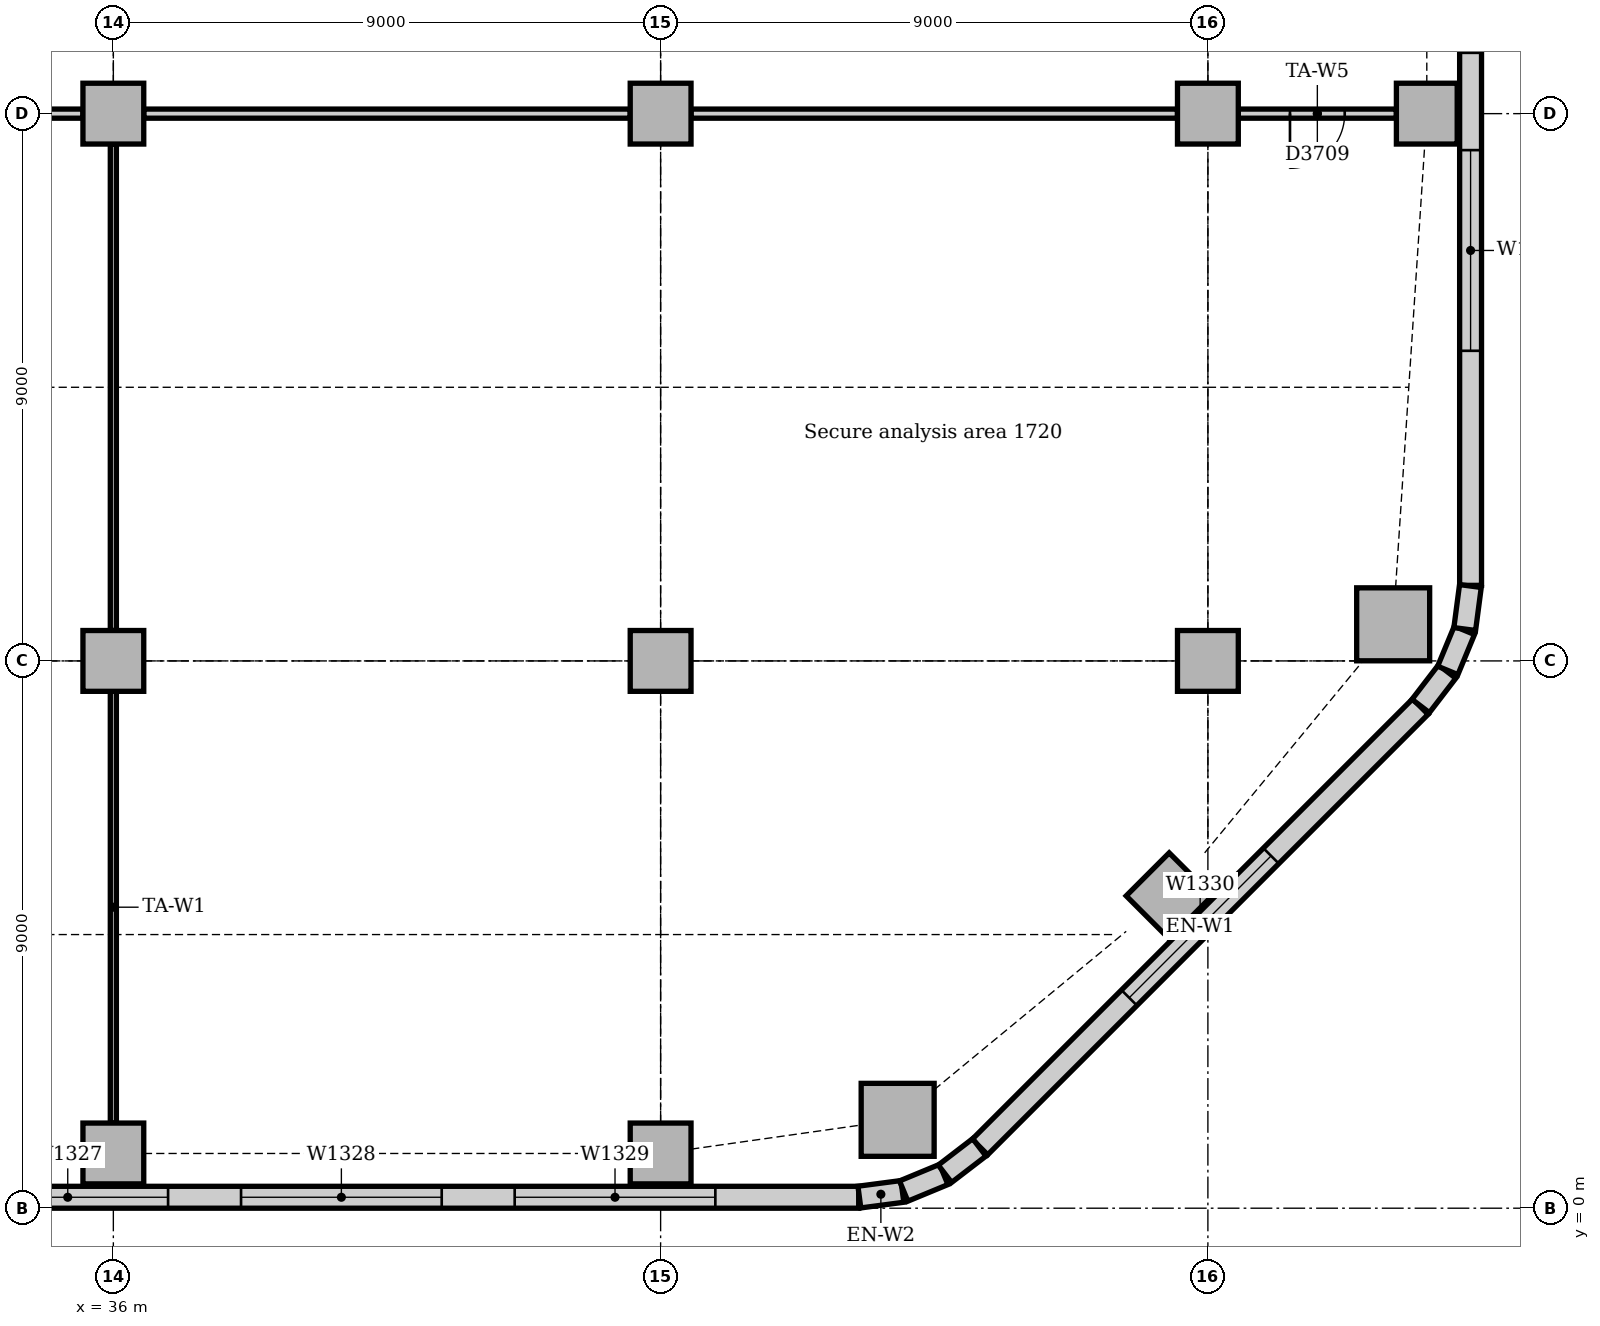
"""IFC4 building model, lengths in metres.
Left out: names, types, materials, properties, quantities, classifications, styles, units other than length and angle.
Written with IfcOpenShell. Run it as: python <this file> out.ifc"""

import sys

from ifc_helpers import new_model, si_unit, direction, frame, frame_2d, origin, origin_2d, place, context, subcontext, project, spatial, rectangle, extrude, element, fill, save


model = new_model("IFC4")
c1 = context("Model", 3, precision=1e-05, world=origin(), true_north=direction((0.0, 1.0)))
c2 = subcontext(c1, "Body", "Model", "MODEL_VIEW")
j1 = project(units=[si_unit("LENGTHUNIT", "METRE"), si_unit("PLANEANGLEUNIT", "RADIAN")], contexts=[c1])
p1 = place(None, origin())
s1 = spatial("IfcSite", under=j1, at=p1, CompositionType="ELEMENT")
p2 = place(p1, origin())
s2 = spatial("IfcBuilding", under=s1, at=p2, CompositionType="ELEMENT")
p3 = place(p2, frame((0.0, 0.0, 75.0)))
s3 = spatial("IfcBuildingStorey", under=s2, at=p3, CompositionType="ELEMENT", Elevation=75.0)
for number, where, z_axis, x_axis in (
    (1, (48.898, 1.453, 0.0), (0.0, 0.0, 1.0), (1.0, 0.0, 0.0)),
    (2, (57.047, 9.602, 0.0), (0.0, 0.0, 1.0), (1.0, 0.0, 0.0)),
):
    element("IfcColumn", number, at=place(p3, frame(where, z_axis=z_axis, x_axis=x_axis)), inside=s3, PredefinedType="COLUMN", context=c2, shape_type="SweptSolid", body=[
        extrude(rectangle(XDim=1.2, YDim=1.2, at=origin_2d()), origin(), (0.0, 0.0, 1.0), 3.85),
    ])
for number, where, z_axis, x_axis in (
    (3, (36.0, 0.9, 0.0), (0.0, 0.0, 1.0), (1.0, 0.0, 0.0)),
    (4, (45.0, 0.9, 0.0), (0.0, 0.0, 1.0), (1.0, 0.0, 0.0)),
    (5, (53.364, 5.136, 0.0), (0.0, 0.0, 1.0), (0.707, 0.707, 0.0)),
    (6, (57.6, 18.0, 0.0), (0.0, 0.0, 1.0), (1.0, 0.0, 0.0)),
    (7, (36.0, 9.0, 0.0), (0.0, 0.0, 1.0), (1.0, 0.0, 0.0)),
    (8, (36.0, 18.0, 0.0), (0.0, 0.0, 1.0), (1.0, 0.0, 0.0)),
    (9, (45.0, 9.0, 0.0), (0.0, 0.0, 1.0), (1.0, 0.0, 0.0)),
    (10, (45.0, 18.0, 0.0), (0.0, 0.0, 1.0), (1.0, 0.0, 0.0)),
    (11, (54.0, 9.0, 0.0), (0.0, 0.0, 1.0), (1.0, 0.0, 0.0)),
    (12, (54.0, 18.0, 0.0), (0.0, 0.0, 1.0), (1.0, 0.0, 0.0)),
):
    element("IfcColumn", number, at=place(p3, frame(where, z_axis=z_axis, x_axis=x_axis)), inside=s3, PredefinedType="COLUMN", context=c2, shape_type="SweptSolid", body=[
        extrude(rectangle(XDim=1.0, YDim=1.0, at=origin_2d()), origin(), (0.0, 0.0, 1.0), 3.85),
    ])
p4 = place(p3, frame((4.243, 0.18, 0.0), z_axis=(0.0, 0.0, 1.0), x_axis=(1.0, 0.0, 0.0)))
e13 = element("IfcWall", 13, at=p4, inside=s3, PredefinedType="STANDARD", context=c2, shape_type="SweptSolid", body=[
    extrude(rectangle(XDim=44.015, YDim=0.36, at=frame_2d((22.007, 0.0))), origin(), (0.0, 0.0, 1.0), 3.85),
])
p5 = place(p4, frame((2.357, 0.0, 0.9)))
e14 = element("IfcOpeningElement", 14, at=p5, cuts=e13, PredefinedType="OPENING", context=c2, shape_type="SweptSolid", body=[
    extrude(rectangle(XDim=3.3, YDim=1.6, at=frame_2d((1.65, 0.8))), frame((0.0, 0.19, 0.0), z_axis=(0.0, -1.0, 0.0), x_axis=(1.0, 0.0, 0.0)), (0.0, 0.0, 1.0), 0.38),
])
p6 = place(p4, frame((6.857, 0.0, 0.9)))
e15 = element("IfcOpeningElement", 15, at=p6, cuts=e13, PredefinedType="OPENING", context=c2, shape_type="SweptSolid", body=[
    extrude(rectangle(XDim=3.3, YDim=1.6, at=frame_2d((1.65, 0.8))), frame((0.0, 0.19, 0.0), z_axis=(0.0, -1.0, 0.0), x_axis=(1.0, 0.0, 0.0)), (0.0, 0.0, 1.0), 0.38),
])
p7 = place(p4, frame((11.357, 0.0, 0.9)))
e16 = element("IfcOpeningElement", 16, at=p7, cuts=e13, PredefinedType="OPENING", context=c2, shape_type="SweptSolid", body=[
    extrude(rectangle(XDim=3.3, YDim=1.6, at=frame_2d((1.65, 0.8))), frame((0.0, 0.19, 0.0), z_axis=(0.0, -1.0, 0.0), x_axis=(1.0, 0.0, 0.0)), (0.0, 0.0, 1.0), 0.38),
])
p8 = place(p4, frame((15.857, 0.0, 0.9)))
e17 = element("IfcOpeningElement", 17, at=p8, cuts=e13, PredefinedType="OPENING", context=c2, shape_type="SweptSolid", body=[
    extrude(rectangle(XDim=3.3, YDim=1.6, at=frame_2d((1.65, 0.8))), frame((0.0, 0.19, 0.0), z_axis=(0.0, -1.0, 0.0), x_axis=(1.0, 0.0, 0.0)), (0.0, 0.0, 1.0), 0.38),
])
p9 = place(p4, frame((20.357, 0.0, 0.9)))
e18 = element("IfcOpeningElement", 18, at=p9, cuts=e13, PredefinedType="OPENING", context=c2, shape_type="SweptSolid", body=[
    extrude(rectangle(XDim=3.3, YDim=1.6, at=frame_2d((1.65, 0.8))), frame((0.0, 0.19, 0.0), z_axis=(0.0, -1.0, 0.0), x_axis=(1.0, 0.0, 0.0)), (0.0, 0.0, 1.0), 0.38),
])
p10 = place(p4, frame((24.857, 0.0, 0.9)))
e19 = element("IfcOpeningElement", 19, at=p10, cuts=e13, PredefinedType="OPENING", context=c2, shape_type="SweptSolid", body=[
    extrude(rectangle(XDim=3.3, YDim=1.6, at=frame_2d((1.65, 0.8))), frame((0.0, 0.19, 0.0), z_axis=(0.0, -1.0, 0.0), x_axis=(1.0, 0.0, 0.0)), (0.0, 0.0, 1.0), 0.38),
])
p11 = place(p4, frame((29.357, 0.0, 0.9)))
e20 = element("IfcOpeningElement", 20, at=p11, cuts=e13, PredefinedType="OPENING", context=c2, shape_type="SweptSolid", body=[
    extrude(rectangle(XDim=3.3, YDim=1.6, at=frame_2d((1.65, 0.8))), frame((0.0, 0.19, 0.0), z_axis=(0.0, -1.0, 0.0), x_axis=(1.0, 0.0, 0.0)), (0.0, 0.0, 1.0), 0.38),
])
p12 = place(p4, frame((33.857, 0.0, 0.9)))
e21 = element("IfcOpeningElement", 21, at=p12, cuts=e13, PredefinedType="OPENING", context=c2, shape_type="SweptSolid", body=[
    extrude(rectangle(XDim=3.3, YDim=1.6, at=frame_2d((1.65, 0.8))), frame((0.0, 0.19, 0.0), z_axis=(0.0, -1.0, 0.0), x_axis=(1.0, 0.0, 0.0)), (0.0, 0.0, 1.0), 0.38),
])
p13 = place(p4, frame((38.357, 0.0, 0.9)))
e22 = element("IfcOpeningElement", 22, at=p13, cuts=e13, PredefinedType="OPENING", context=c2, shape_type="SweptSolid", body=[
    extrude(rectangle(XDim=3.3, YDim=1.6, at=frame_2d((1.65, 0.8))), frame((0.0, 0.19, 0.0), z_axis=(0.0, -1.0, 0.0), x_axis=(1.0, 0.0, 0.0)), (0.0, 0.0, 1.0), 0.38),
])
p14 = place(p3, frame((50.251, 1.006, 0.0), z_axis=(0.0, 0.0, 1.0), x_axis=(0.707106781187, 0.707106781187, 0.0)))
e23 = element("IfcWall", 23, at=p14, inside=s3, PredefinedType="STANDARD", context=c2, shape_type="SweptSolid", body=[
    extrude(rectangle(XDim=10.243, YDim=0.36, at=frame_2d((5.121, 0.0))), origin(), (0.0, 0.0, 1.0), 3.85),
])
p15 = place(p14, frame((3.471, 0.0, 0.9)))
e24 = element("IfcOpeningElement", 24, at=p15, cuts=e23, PredefinedType="OPENING", context=c2, shape_type="SweptSolid", body=[
    extrude(rectangle(XDim=3.3, YDim=1.6, at=frame_2d((1.65, 0.8))), frame((0.0, 0.19, 0.0), z_axis=(0.0, -1.0, 0.0), x_axis=(1.0, 0.0, 0.0)), (0.0, 0.0, 1.0), 0.38),
])
p16 = place(p3, frame((58.32, 10.243, 0.0), z_axis=(0.0, 0.0, 1.0), x_axis=(0.0, 1.0, 0.0)))
e25 = element("IfcWall", 25, at=p16, inside=s3, PredefinedType="STANDARD", context=c2, shape_type="SweptSolid", body=[
    extrude(rectangle(XDim=24.515, YDim=0.36, at=frame_2d((12.257, 0.0))), origin(), (0.0, 0.0, 1.0), 3.85),
])
p17 = place(p16, frame((3.857, 0.0, 0.9)))
e26 = element("IfcOpeningElement", 26, at=p17, cuts=e25, PredefinedType="OPENING", context=c2, shape_type="SweptSolid", body=[
    extrude(rectangle(XDim=3.3, YDim=1.6, at=frame_2d((1.65, 0.8))), frame((0.0, 0.19, 0.0), z_axis=(0.0, -1.0, 0.0), x_axis=(1.0, 0.0, 0.0)), (0.0, 0.0, 1.0), 0.38),
])
p18 = place(p16, frame((8.757, 0.0, 0.9)))
e27 = element("IfcOpeningElement", 27, at=p18, cuts=e25, PredefinedType="OPENING", context=c2, shape_type="SweptSolid", body=[
    extrude(rectangle(XDim=1.8, YDim=1.6, at=frame_2d((0.9, 0.8))), frame((0.0, 0.19, 0.0), z_axis=(0.0, -1.0, 0.0), x_axis=(1.0, 0.0, 0.0)), (0.0, 0.0, 1.0), 0.38),
])
p19 = place(p16, frame((12.557, 0.0, 0.9)))
e28 = element("IfcOpeningElement", 28, at=p19, cuts=e25, PredefinedType="OPENING", context=c2, shape_type="SweptSolid", body=[
    extrude(rectangle(XDim=3.3, YDim=1.6, at=frame_2d((1.65, 0.8))), frame((0.0, 0.19, 0.0), z_axis=(0.0, -1.0, 0.0), x_axis=(1.0, 0.0, 0.0)), (0.0, 0.0, 1.0), 0.38),
])
p20 = place(p16, frame((17.357, 0.0, 0.9)))
e29 = element("IfcOpeningElement", 29, at=p20, cuts=e25, PredefinedType="OPENING", context=c2, shape_type="SweptSolid", body=[
    extrude(rectangle(XDim=3.3, YDim=1.6, at=frame_2d((1.65, 0.8))), frame((0.0, 0.19, 0.0), z_axis=(0.0, -1.0, 0.0), x_axis=(1.0, 0.0, 0.0)), (0.0, 0.0, 1.0), 0.38),
])
for number, where, z_axis, x_axis in (
    (30, (48.269, 0.183, 0.0), (0.0, 0.0, 1.0), (0.991, 0.131, 0.0)),
    (31, (48.997, 0.282, 0.0), (0.0, 0.0, 1.0), (0.924, 0.383, 0.0)),
):
    element("IfcWall", number, at=place(p3, frame(where, z_axis=z_axis, x_axis=x_axis)), inside=s3, PredefinedType="STANDARD", context=c2, shape_type="SweptSolid", body=[
        extrude(rectangle(XDim=0.713, YDim=0.36, at=frame_2d((0.356, 0.0))), origin(), (0.0, 0.0, 1.0), 3.85),
    ])
for number, where, z_axis, x_axis in (
    (32, (49.675, 0.566, 0.0), (0.0, 0.0, 1.0), (0.793, 0.609, 0.0)),
    (33, (57.5, 8.259, 0.0), (0.0, 0.0, 1.0), (0.609, 0.793, 0.0)),
):
    element("IfcWall", number, at=place(p3, frame(where, z_axis=z_axis, x_axis=x_axis)), inside=s3, PredefinedType="STANDARD", context=c2, shape_type="SweptSolid", body=[
        extrude(rectangle(XDim=0.713, YDim=0.36, at=frame_2d((0.357, 0.0))), origin(), (0.0, 0.0, 1.0), 3.85),
    ])
for number, where, z_axis, x_axis in (
    (34, (57.945, 8.844, 0.0), (0.0, 0.0, 1.0), (0.383, 0.924, 0.0)),
    (35, (58.224, 9.524, 0.0), (0.0, 0.0, 1.0), (0.131, 0.991, 0.0)),
):
    element("IfcWall", number, at=place(p3, frame(where, z_axis=z_axis, x_axis=x_axis)), inside=s3, PredefinedType="STANDARD", context=c2, shape_type="SweptSolid", body=[
        extrude(rectangle(XDim=0.713, YDim=0.36, at=frame_2d((0.356, 0.0))), origin(), (0.0, 0.0, 1.0), 3.85),
    ])
p21 = place(p3, frame((54.5, 18.0, 0.0), z_axis=(0.0, 0.0, 1.0), x_axis=(1.0, 0.0, 0.0)))
e36 = element("IfcWall", 36, at=p21, inside=s3, PredefinedType="PARTITIONING", context=c2, shape_type="SweptSolid", body=[
    extrude(rectangle(XDim=2.6, YDim=0.15, at=frame_2d((1.3, 0.0))), origin(), (0.0, 0.0, 1.0), 3.602),
])
p22 = place(p21, frame((0.85, 0.0, 0.0)))
e37 = element("IfcOpeningElement", 37, at=p22, cuts=e36, PredefinedType="OPENING", context=c2, shape_type="SweptSolid", body=[
    extrude(rectangle(XDim=0.9, YDim=2.1, at=frame_2d((0.45, 1.05))), frame((0.0, 0.085, 0.0), z_axis=(0.0, -1.0, 0.0), x_axis=(1.0, 0.0, 0.0)), (0.0, 0.0, 1.0), 0.17),
])
for number, where, z_axis, x_axis in (
    (38, (45.5, 18.0, 0.0), (0.0, 0.0, 1.0), (1.0, 0.0, 0.0)),
    (39, (36.5, 18.0, 0.0), (0.0, 0.0, 1.0), (1.0, 0.0, 0.0)),
):
    element("IfcWall", number, at=place(p3, frame(where, z_axis=z_axis, x_axis=x_axis)), inside=s3, PredefinedType="PARTITIONING", context=c2, shape_type="SweptSolid", body=[
        extrude(rectangle(XDim=8.0, YDim=0.15, at=frame_2d((4.0, 0.0))), origin(), (0.0, 0.0, 1.0), 3.15),
    ])
p23 = place(p3, frame((27.5, 18.0, 0.0), z_axis=(0.0, 0.0, 1.0), x_axis=(1.0, 0.0, 0.0)))
e40 = element("IfcWall", 40, at=p23, inside=s3, PredefinedType="PARTITIONING", context=c2, shape_type="SweptSolid", body=[
    extrude(rectangle(XDim=8.0, YDim=0.15, at=frame_2d((4.0, 0.0))), origin(), (0.0, 0.0, 1.0), 3.15),
])
p24 = place(p23, frame((3.55, 0.0, 0.0)))
e41 = element("IfcOpeningElement", 41, at=p24, cuts=e40, PredefinedType="OPENING", context=c2, shape_type="SweptSolid", body=[
    extrude(rectangle(XDim=0.9, YDim=2.1, at=frame_2d((0.45, 1.05))), frame((0.0, 0.085, 0.0), z_axis=(0.0, -1.0, 0.0), x_axis=(1.0, 0.0, 0.0)), (0.0, 0.0, 1.0), 0.17),
])
p25 = place(p3, frame((36.0, 1.4, 0.0), z_axis=(0.0, 0.0, 1.0), x_axis=(0.0, 1.0, 0.0)))
e42 = element("IfcWall", 42, at=p25, inside=s3, PredefinedType="PARTITIONING", context=c2, shape_type="SweptSolid", body=[
    extrude(rectangle(XDim=7.1, YDim=0.1, at=frame_2d((3.55, 0.0))), origin(), (0.0, 0.0, 1.0), 3.158),
])
p26 = place(p3, frame((36.0, 9.5, 0.0), z_axis=(0.0, 0.0, 1.0), x_axis=(0.0, 1.0, 0.0)))
e43 = element("IfcWall", 43, at=p26, inside=s3, PredefinedType="PARTITIONING", context=c2, shape_type="SweptSolid", body=[
    extrude(rectangle(XDim=8.0, YDim=0.1, at=frame_2d((4.0, 0.0))), origin(), (0.0, 0.0, 1.0), 3.158),
])
p27 = place(p11, origin())
e44 = element("IfcWindow", 44, at=p27, inside=s3, PartitioningType="SINGLE_PANEL", PredefinedType="WINDOW", context=c2, shape_type="SweptSolid", body=[
    extrude(rectangle(XDim=3.3, YDim=1.6, at=frame_2d((1.65, 0.8))), frame((0.0, 0.13, 0.0), z_axis=(0.0, -1.0, 0.0), x_axis=(1.0, 0.0, 0.0)), (0.0, 0.0, 1.0), 0.06),
])
fill(e20, e44)
p28 = place(p12, origin())
e45 = element("IfcWindow", 45, at=p28, inside=s3, PartitioningType="SINGLE_PANEL", PredefinedType="WINDOW", context=c2, shape_type="SweptSolid", body=[
    extrude(rectangle(XDim=3.3, YDim=1.6, at=frame_2d((1.65, 0.8))), frame((0.0, 0.13, 0.0), z_axis=(0.0, -1.0, 0.0), x_axis=(1.0, 0.0, 0.0)), (0.0, 0.0, 1.0), 0.06),
])
fill(e21, e45)
p29 = place(p13, origin())
e46 = element("IfcWindow", 46, at=p29, inside=s3, PartitioningType="SINGLE_PANEL", PredefinedType="WINDOW", context=c2, shape_type="SweptSolid", body=[
    extrude(rectangle(XDim=3.3, YDim=1.6, at=frame_2d((1.65, 0.8))), frame((0.0, 0.13, 0.0), z_axis=(0.0, -1.0, 0.0), x_axis=(1.0, 0.0, 0.0)), (0.0, 0.0, 1.0), 0.06),
])
fill(e22, e46)
p30 = place(p15, origin())
e47 = element("IfcWindow", 47, at=p30, inside=s3, PartitioningType="SINGLE_PANEL", PredefinedType="WINDOW", context=c2, shape_type="SweptSolid", body=[
    extrude(rectangle(XDim=3.3, YDim=1.6, at=frame_2d((1.65, 0.8))), frame((0.0, 0.13, 0.0), z_axis=(0.0, -1.0, 0.0), x_axis=(1.0, 0.0, 0.0)), (0.0, 0.0, 1.0), 0.06),
])
fill(e24, e47)
p31 = place(p17, origin())
e48 = element("IfcWindow", 48, at=p31, inside=s3, PartitioningType="SINGLE_PANEL", PredefinedType="WINDOW", context=c2, shape_type="SweptSolid", body=[
    extrude(rectangle(XDim=3.3, YDim=1.6, at=frame_2d((1.65, 0.8))), frame((0.0, 0.13, 0.0), z_axis=(0.0, -1.0, 0.0), x_axis=(1.0, 0.0, 0.0)), (0.0, 0.0, 1.0), 0.06),
])
fill(e26, e48)
p32 = place(p22, frame((0.9, 0.0, 0.0), z_axis=(0.0, 0.0, 1.0), x_axis=(-1.0, 0.0, 0.0)))
e49 = element("IfcDoor", 49, at=p32, inside=s3, OperationType="SINGLE_SWING_RIGHT", PredefinedType="DOOR", context=c2, shape_type="SweptSolid", body=[
    extrude(rectangle(XDim=0.9, YDim=2.1, at=frame_2d((0.45, 1.05))), frame((0.0, 0.025, 0.0), z_axis=(0.0, -1.0, 0.0), x_axis=(1.0, 0.0, 0.0)), (0.0, 0.0, 1.0), 0.05),
])
fill(e37, e49)
save(model, sys.argv[1])
